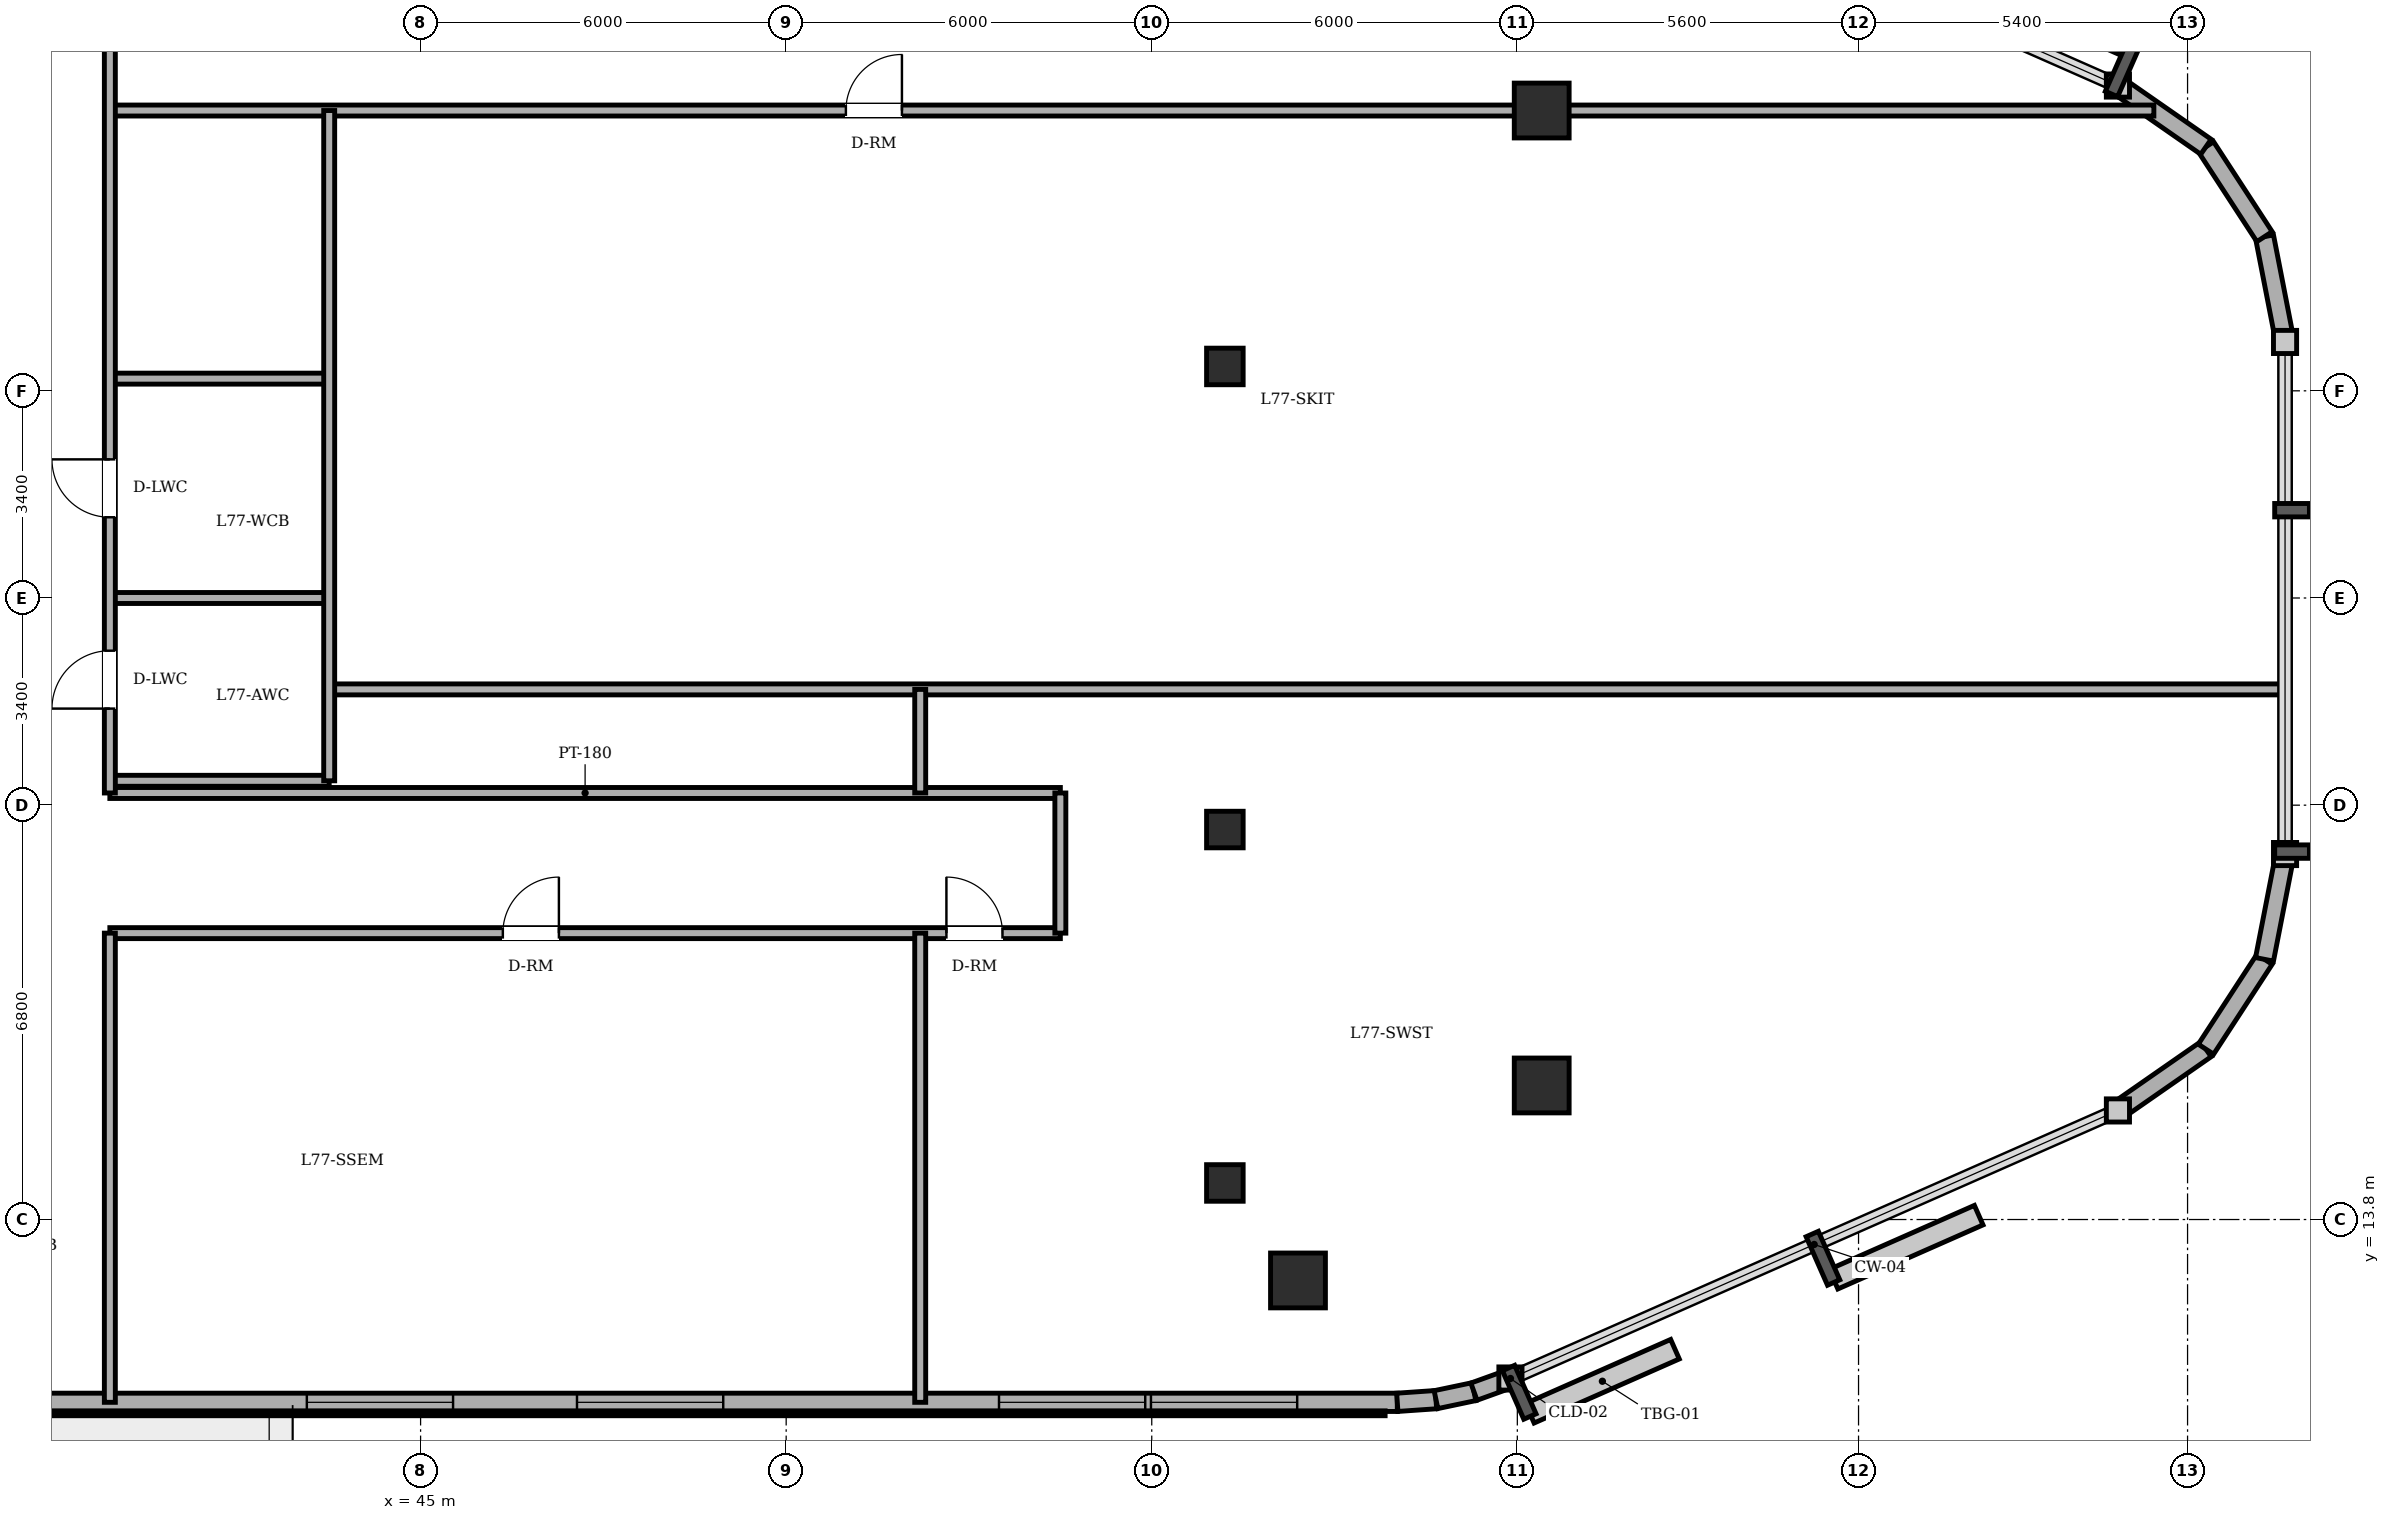
"""IFC4 building model, lengths in metres.
Left out: names, types, materials, properties, quantities, classifications, styles, units other than length and angle.
Written with IfcOpenShell. Run it as: python <this file> out.ifc"""

import sys

from ifc_helpers import new_model, si_unit, direction, frame, frame_2d, origin, origin_2d, place, context, subcontext, project, spatial, rectangle, circle, extrude, element, fill, save


model = new_model("IFC4")
c1 = context("Model", 3, precision=1e-05, world=origin(), true_north=direction((0.0, 1.0)))
c2 = subcontext(c1, "Body", "Model", "MODEL_VIEW")
j1 = project(units=[si_unit("LENGTHUNIT", "METRE"), si_unit("PLANEANGLEUNIT", "RADIAN")], contexts=[c1])
p1 = place(None, origin())
s1 = spatial("IfcSite", under=j1, at=p1, CompositionType="ELEMENT")
p2 = place(p1, origin())
s2 = spatial("IfcBuilding", under=s1, at=p2, CompositionType="ELEMENT")
p3 = place(p2, frame((0.0, 0.0, 295.3)))
s3 = spatial("IfcBuildingStorey", under=s2, at=p3, CompositionType="ELEMENT", Elevation=295.3)
for number, where, z_axis, x_axis in (
    (1, (59.4, 12.8, 0.0), (0.0, 0.0, 1.0), (1.0, 0.0, 0.0)),
    (2, (63.4, 16.0, 0.0), (0.0, 0.0, 1.0), (1.0, 0.0, 0.0)),
    (3, (63.4, 32.0, 0.0), (0.0, 0.0, 1.0), (1.0, 0.0, 0.0)),
):
    element("IfcColumn", number, at=place(p3, frame(where, z_axis=z_axis, x_axis=x_axis)), inside=s3, PredefinedType="COLUMN", context=c2, shape_type="SweptSolid", body=[
        extrude(circle(Radius=0.45, at=origin_2d()), origin(), (0.0, 0.0, 1.0), 5.1),
    ])
for number, where, z_axis, x_axis in (
    (4, (58.2, 14.4, 0.0), (0.0, 0.0, 1.0), (1.0, 0.0, 0.0)),
    (5, (58.2, 20.2, 0.0), (0.0, 0.0, 1.0), (1.0, 0.0, 0.0)),
    (6, (58.2, 27.8, 0.0), (0.0, 0.0, 1.0), (1.0, 0.0, 0.0)),
):
    element("IfcColumn", number, at=place(p3, frame(where, z_axis=z_axis, x_axis=x_axis)), inside=s3, PredefinedType="COLUMN", context=c2, shape_type="SweptSolid", body=[
        extrude(rectangle(XDim=0.6, YDim=0.6, at=origin_2d()), origin(), (0.0, 0.0, 1.0), 5.1),
    ])
p4 = place(p3, frame((24.0, 10.8, 0.0), z_axis=(0.0, 0.0, 1.0), x_axis=(1.0, 0.0, 0.0)))
e7 = element("IfcWall", 7, at=p4, inside=s3, PredefinedType="SOLIDWALL", context=c2, shape_type="SweptSolid", body=[
    extrude(rectangle(XDim=37.03, YDim=0.3, at=frame_2d((18.515, 0.0))), origin(), (0.0, 0.0, 1.0), 4.85),
])
p5 = place(p4, frame((6.425, 0.0, 0.0)))
e8 = element("IfcOpeningElement", 8, at=p5, cuts=e7, PredefinedType="OPENING", context=c2, shape_type="SweptSolid", body=[
    extrude(rectangle(XDim=0.95, YDim=2.2, at=frame_2d((0.475, 1.1))), frame((0.0, 0.16, 0.0), z_axis=(0.0, -1.0, 0.0), x_axis=(1.0, 0.0, 0.0)), (0.0, 0.0, 1.0), 0.32),
])
p6 = place(p4, frame((9.517, 0.0, 0.85)))
e9 = element("IfcOpeningElement", 9, at=p6, cuts=e7, PredefinedType="OPENING", context=c2, shape_type="SweptSolid", body=[
    extrude(rectangle(XDim=2.4, YDim=2.1, at=frame_2d((1.2, 1.05))), frame((0.0, 0.16, 0.0), z_axis=(0.0, -1.0, 0.0), x_axis=(1.0, 0.0, 0.0)), (0.0, 0.0, 1.0), 0.32),
])
p7 = place(p4, frame((19.133, 0.0, 0.85)))
e10 = element("IfcOpeningElement", 10, at=p7, cuts=e7, PredefinedType="OPENING", context=c2, shape_type="SweptSolid", body=[
    extrude(rectangle(XDim=2.4, YDim=2.1, at=frame_2d((1.2, 1.05))), frame((0.0, 0.16, 0.0), z_axis=(0.0, -1.0, 0.0), x_axis=(1.0, 0.0, 0.0)), (0.0, 0.0, 1.0), 0.32),
])
p8 = place(p4, frame((23.567, 0.0, 0.85)))
e11 = element("IfcOpeningElement", 11, at=p8, cuts=e7, PredefinedType="OPENING", context=c2, shape_type="SweptSolid", body=[
    extrude(rectangle(XDim=2.4, YDim=2.1, at=frame_2d((1.2, 1.05))), frame((0.0, 0.16, 0.0), z_axis=(0.0, -1.0, 0.0), x_axis=(1.0, 0.0, 0.0)), (0.0, 0.0, 1.0), 0.32),
])
p9 = place(p4, frame((30.493, 0.0, 0.85)))
e12 = element("IfcOpeningElement", 12, at=p9, cuts=e7, PredefinedType="OPENING", context=c2, shape_type="SweptSolid", body=[
    extrude(rectangle(XDim=2.4, YDim=2.1, at=frame_2d((1.2, 1.05))), frame((0.0, 0.16, 0.0), z_axis=(0.0, -1.0, 0.0), x_axis=(1.0, 0.0, 0.0)), (0.0, 0.0, 1.0), 0.32),
])
p10 = place(p4, frame((32.987, 0.0, 0.85)))
e13 = element("IfcOpeningElement", 13, at=p10, cuts=e7, PredefinedType="OPENING", context=c2, shape_type="SweptSolid", body=[
    extrude(rectangle(XDim=2.4, YDim=2.1, at=frame_2d((1.2, 1.05))), frame((0.0, 0.16, 0.0), z_axis=(0.0, -1.0, 0.0), x_axis=(1.0, 0.0, 0.0)), (0.0, 0.0, 1.0), 0.32),
])
p11 = place(p3, frame((61.03, 10.8, 0.0), z_axis=(0.0, 0.0, 1.0), x_axis=(0.997613959688, 0.069039028352, 0.0)))
e14 = element("IfcWall", 14, at=p11, inside=s3, PredefinedType="SOLIDWALL", context=c2, shape_type="SweptSolid", body=[
    extrude(rectangle(XDim=0.636, YDim=0.3, at=frame_2d((0.318, 0.0))), origin(), (0.0, 0.0, 1.0), 4.85),
])
p12 = place(p3, frame((61.665, 10.844, 0.0), z_axis=(0.0, 0.0, 1.0), x_axis=(0.97857012251, 0.205913854149, 0.0)))
e15 = element("IfcWall", 15, at=p12, inside=s3, PredefinedType="SOLIDWALL", context=c2, shape_type="SweptSolid", body=[
    extrude(rectangle(XDim=0.637, YDim=0.3, at=frame_2d((0.318, 0.0))), origin(), (0.0, 0.0, 1.0), 4.85),
])
p13 = place(p3, frame((62.288, 10.975, 0.0), z_axis=(0.0, 0.0, 1.0), x_axis=(0.94077491148, 0.339031806665, 0.0)))
e16 = element("IfcWall", 16, at=p13, inside=s3, PredefinedType="SOLIDWALL", context=c2, shape_type="SweptSolid", body=[
    extrude(rectangle(XDim=0.636, YDim=0.3, at=frame_2d((0.318, 0.0))), origin(), (0.0, 0.0, 1.0), 4.85),
])
p14 = place(p3, frame((72.857, 15.59, 0.0), z_axis=(0.0, 0.0, 1.0), x_axis=(0.821006966142, 0.570918174124, 0.0)))
e17 = element("IfcWall", 17, at=p14, inside=s3, PredefinedType="SOLIDWALL", context=c2, shape_type="SweptSolid", body=[
    extrude(rectangle(XDim=1.76, YDim=0.3, at=frame_2d((0.88, 0.0))), origin(), (0.0, 0.0, 1.0), 4.85),
])
for number, where, z_axis, x_axis in (
    (18, (74.302, 16.595, 0.0), (0.0, 0.0, 1.0), (0.546, 0.838, 0.0)),
    (19, (75.263, 18.07, 0.0), (0.0, 0.0, 1.0), (0.192, 0.981, 0.0)),
    (20, (75.6, 28.202, 0.0), (0.0, 0.0, 1.0), (-0.192, 0.981, 0.0)),
    (21, (75.263, 29.93, 0.0), (0.0, 0.0, 1.0), (-0.546, 0.838, 0.0)),
):
    element("IfcWall", number, at=place(p3, frame(where, z_axis=z_axis, x_axis=x_axis)), inside=s3, PredefinedType="SOLIDWALL", context=c2, shape_type="SweptSolid", body=[
        extrude(rectangle(XDim=1.76, YDim=0.3, at=frame_2d((0.88, 0.0))), origin(), (0.0, 0.0, 1.0), 4.85),
    ])
p15 = place(p3, frame((74.302, 31.405, 0.0), z_axis=(0.0, 0.0, 1.0), x_axis=(-0.821006966142, 0.570918174124, 0.0)))
e22 = element("IfcWall", 22, at=p15, inside=s3, PredefinedType="SOLIDWALL", context=c2, shape_type="SweptSolid", body=[
    extrude(rectangle(XDim=1.76, YDim=0.3, at=frame_2d((0.88, 0.0))), origin(), (0.0, 0.0, 1.0), 4.85),
])
p16 = place(p3, frame((39.9, 18.5, 0.0), z_axis=(0.0, 0.0, 1.0), x_axis=(1.0, 0.0, 0.0)))
e23 = element("IfcWall", 23, at=p16, inside=s3, PredefinedType="PARTITIONING", context=c2, shape_type="SweptSolid", body=[
    extrude(rectangle(XDim=15.6, YDim=0.18, at=frame_2d((7.8, 0.0))), origin(), (0.0, 0.0, 1.0), 4.85),
])
p17 = place(p16, frame((6.45, 0.0, 0.0)))
e24 = element("IfcOpeningElement", 24, at=p17, cuts=e23, PredefinedType="OPENING", context=c2, shape_type="SweptSolid", body=[
    extrude(rectangle(XDim=0.92, YDim=2.1, at=frame_2d((0.46, 1.05))), frame((0.0, 0.1, 0.0), z_axis=(0.0, -1.0, 0.0), x_axis=(1.0, 0.0, 0.0)), (0.0, 0.0, 1.0), 0.2),
])
p18 = place(p16, frame((13.73, 0.0, 0.0)))
e25 = element("IfcOpeningElement", 25, at=p18, cuts=e23, PredefinedType="OPENING", context=c2, shape_type="SweptSolid", body=[
    extrude(rectangle(XDim=0.92, YDim=2.1, at=frame_2d((0.46, 1.05))), frame((0.0, 0.1, 0.0), z_axis=(0.0, -1.0, 0.0), x_axis=(1.0, 0.0, 0.0)), (0.0, 0.0, 1.0), 0.2),
])
p19 = place(p3, frame((39.9, 20.8, 0.0), z_axis=(0.0, 0.0, 1.0), x_axis=(1.0, 0.0, 0.0)))
e26 = element("IfcWall", 26, at=p19, inside=s3, PredefinedType="PARTITIONING", context=c2, shape_type="SweptSolid", body=[
    extrude(rectangle(XDim=15.6, YDim=0.18, at=frame_2d((7.8, 0.0))), origin(), (0.0, 0.0, 1.0), 4.85),
])
p20 = place(p3, frame((39.9, 21.0, 0.0), z_axis=(0.0, 0.0, 1.0), x_axis=(1.0, 0.0, 0.0)))
e27 = element("IfcWall", 27, at=p20, inside=s3, PredefinedType="PARTITIONING", context=c2, shape_type="SweptSolid", body=[
    extrude(rectangle(XDim=3.6, YDim=0.18, at=frame_2d((1.8, 0.0))), origin(), (0.0, 0.0, 1.0), 4.85),
])
p21 = place(p3, frame((43.5, 22.5, 0.0), z_axis=(0.0, 0.0, 1.0), x_axis=(1.0, 0.0, 0.0)))
e28 = element("IfcWall", 28, at=p21, inside=s3, PredefinedType="PARTITIONING", context=c2, shape_type="SweptSolid", body=[
    extrude(rectangle(XDim=32.1, YDim=0.18, at=frame_2d((16.05, 0.0))), origin(), (0.0, 0.0, 1.0), 4.85),
])
p22 = place(p3, frame((39.9, 24.0, 0.0), z_axis=(0.0, 0.0, 1.0), x_axis=(1.0, 0.0, 0.0)))
e29 = element("IfcWall", 29, at=p22, inside=s3, PredefinedType="PARTITIONING", context=c2, shape_type="SweptSolid", body=[
    extrude(rectangle(XDim=3.6, YDim=0.18, at=frame_2d((1.8, 0.0))), origin(), (0.0, 0.0, 1.0), 4.592),
])
p23 = place(p3, frame((39.9, 27.6, 0.0), z_axis=(0.0, 0.0, 1.0), x_axis=(1.0, 0.0, 0.0)))
e30 = element("IfcWall", 30, at=p23, inside=s3, PredefinedType="PARTITIONING", context=c2, shape_type="SweptSolid", body=[
    extrude(rectangle(XDim=3.6, YDim=0.18, at=frame_2d((1.8, 0.0))), origin(), (0.0, 0.0, 1.0), 4.492),
])
p24 = place(p3, frame((39.9, 32.0, 0.0), z_axis=(0.0, 0.0, 1.0), x_axis=(1.0, 0.0, 0.0)))
e31 = element("IfcWall", 31, at=p24, inside=s3, PredefinedType="PARTITIONING", context=c2, shape_type="SweptSolid", body=[
    extrude(rectangle(XDim=33.547, YDim=0.18, at=frame_2d((16.773, 0.0))), origin(), (0.0, 0.0, 1.0), 4.592),
])
p25 = place(p24, frame((12.08, 0.0, 0.0)))
e32 = element("IfcOpeningElement", 32, at=p25, cuts=e31, PredefinedType="OPENING", context=c2, shape_type="SweptSolid", body=[
    extrude(rectangle(XDim=0.92, YDim=2.1, at=frame_2d((0.46, 1.05))), frame((0.0, 0.1, 0.0), z_axis=(0.0, -1.0, 0.0), x_axis=(1.0, 0.0, 0.0)), (0.0, 0.0, 1.0), 0.2),
])
p26 = place(p3, frame((39.9, 10.8, 0.0), z_axis=(0.0, 0.0, 1.0), x_axis=(0.0, 1.0, 0.0)))
e33 = element("IfcWall", 33, at=p26, inside=s3, PredefinedType="PARTITIONING", context=c2, shape_type="SweptSolid", body=[
    extrude(rectangle(XDim=7.7, YDim=0.18, at=frame_2d((3.85, 0.0))), origin(), (0.0, 0.0, 1.0), 4.85),
])
p27 = place(p3, frame((39.9, 20.8, 0.0), z_axis=(0.0, 0.0, 1.0), x_axis=(0.0, 1.0, 0.0)))
e34 = element("IfcWall", 34, at=p27, inside=s3, PredefinedType="PARTITIONING", context=c2, shape_type="SweptSolid", body=[
    extrude(rectangle(XDim=16.4, YDim=0.18, at=frame_2d((8.2, 0.0))), origin(), (0.0, 0.0, 1.0), 4.85),
])
p28 = place(p27, frame((1.385, 0.0, 0.0)))
e35 = element("IfcOpeningElement", 35, at=p28, cuts=e34, PredefinedType="OPENING", context=c2, shape_type="SweptSolid", body=[
    extrude(rectangle(XDim=0.95, YDim=2.15, at=frame_2d((0.475, 1.075))), frame((0.0, 0.1, 0.0), z_axis=(0.0, -1.0, 0.0), x_axis=(1.0, 0.0, 0.0)), (0.0, 0.0, 1.0), 0.2),
])
p29 = place(p27, frame((4.525, 0.0, 0.0)))
e36 = element("IfcOpeningElement", 36, at=p29, cuts=e34, PredefinedType="OPENING", context=c2, shape_type="SweptSolid", body=[
    extrude(rectangle(XDim=0.95, YDim=2.15, at=frame_2d((0.475, 1.075))), frame((0.0, 0.1, 0.0), z_axis=(0.0, -1.0, 0.0), x_axis=(1.0, 0.0, 0.0)), (0.0, 0.0, 1.0), 0.2),
])
p30 = place(p27, frame((12.84, 0.0, 0.0)))
e37 = element("IfcOpeningElement", 37, at=p30, cuts=e34, PredefinedType="OPENING", context=c2, shape_type="SweptSolid", body=[
    extrude(rectangle(XDim=0.92, YDim=2.1, at=frame_2d((0.46, 1.05))), frame((0.0, 0.1, 0.0), z_axis=(0.0, -1.0, 0.0), x_axis=(1.0, 0.0, 0.0)), (0.0, 0.0, 1.0), 0.2),
])
p31 = place(p3, frame((43.5, 21.0, 0.0), z_axis=(0.0, 0.0, 1.0), x_axis=(0.0, 1.0, 0.0)))
e38 = element("IfcWall", 38, at=p31, inside=s3, PredefinedType="PARTITIONING", context=c2, shape_type="SweptSolid", body=[
    extrude(rectangle(XDim=11.0, YDim=0.18, at=frame_2d((5.5, 0.0))), origin(), (0.0, 0.0, 1.0), 2.432),
])
p32 = place(p3, frame((53.2, 10.8, 0.0), z_axis=(0.0, 0.0, 1.0), x_axis=(0.0, 1.0, 0.0)))
e39 = element("IfcWall", 39, at=p32, inside=s3, PredefinedType="PARTITIONING", context=c2, shape_type="SweptSolid", body=[
    extrude(rectangle(XDim=7.7, YDim=0.18, at=frame_2d((3.85, 0.0))), origin(), (0.0, 0.0, 1.0), 4.85),
])
p33 = place(p3, frame((53.2, 20.8, 0.0), z_axis=(0.0, 0.0, 1.0), x_axis=(0.0, 1.0, 0.0)))
e40 = element("IfcWall", 40, at=p33, inside=s3, PredefinedType="PARTITIONING", context=c2, shape_type="SweptSolid", body=[
    extrude(rectangle(XDim=1.7, YDim=0.18, at=frame_2d((0.85, 0.0))), origin(), (0.0, 0.0, 1.0), 4.85),
])
p34 = place(p3, frame((55.5, 18.5, 0.0), z_axis=(0.0, 0.0, 1.0), x_axis=(0.0, 1.0, 0.0)))
e41 = element("IfcWall", 41, at=p34, inside=s3, PredefinedType="PARTITIONING", context=c2, shape_type="SweptSolid", body=[
    extrude(rectangle(XDim=2.3, YDim=0.18, at=frame_2d((1.15, 0.0))), origin(), (0.0, 0.0, 1.0), 4.85),
])
p35 = place(p7, origin())
e42 = element("IfcWindow", 42, at=p35, inside=s3, PartitioningType="TRIPLE_PANEL_VERTICAL", PredefinedType="WINDOW", context=c2, shape_type="SweptSolid", body=[
    extrude(rectangle(XDim=2.4, YDim=2.1, at=frame_2d((1.2, 1.05))), frame((0.0, 0.03, 0.0), z_axis=(0.0, -1.0, 0.0), x_axis=(1.0, 0.0, 0.0)), (0.0, 0.0, 1.0), 0.06),
])
fill(e10, e42)
p36 = place(p8, origin())
e43 = element("IfcWindow", 43, at=p36, inside=s3, PartitioningType="TRIPLE_PANEL_VERTICAL", PredefinedType="WINDOW", context=c2, shape_type="SweptSolid", body=[
    extrude(rectangle(XDim=2.4, YDim=2.1, at=frame_2d((1.2, 1.05))), frame((0.0, 0.03, 0.0), z_axis=(0.0, -1.0, 0.0), x_axis=(1.0, 0.0, 0.0)), (0.0, 0.0, 1.0), 0.06),
])
fill(e11, e43)
p37 = place(p9, origin())
e44 = element("IfcWindow", 44, at=p37, inside=s3, PartitioningType="TRIPLE_PANEL_VERTICAL", PredefinedType="WINDOW", context=c2, shape_type="SweptSolid", body=[
    extrude(rectangle(XDim=2.4, YDim=2.1, at=frame_2d((1.2, 1.05))), frame((0.0, 0.03, 0.0), z_axis=(0.0, -1.0, 0.0), x_axis=(1.0, 0.0, 0.0)), (0.0, 0.0, 1.0), 0.06),
])
fill(e12, e44)
p38 = place(p10, origin())
e45 = element("IfcWindow", 45, at=p38, inside=s3, PartitioningType="TRIPLE_PANEL_VERTICAL", PredefinedType="WINDOW", context=c2, shape_type="SweptSolid", body=[
    extrude(rectangle(XDim=2.4, YDim=2.1, at=frame_2d((1.2, 1.05))), frame((0.0, 0.03, 0.0), z_axis=(0.0, -1.0, 0.0), x_axis=(1.0, 0.0, 0.0)), (0.0, 0.0, 1.0), 0.06),
])
fill(e13, e45)
p39 = place(p28, origin())
e46 = element("IfcDoor", 46, at=p39, inside=s3, OperationType="SINGLE_SWING_LEFT", PredefinedType="DOOR", context=c2, shape_type="SweptSolid", body=[
    extrude(rectangle(XDim=0.95, YDim=2.15, at=frame_2d((0.475, 1.075))), frame((0.0, 0.025, 0.0), z_axis=(0.0, -1.0, 0.0), x_axis=(1.0, 0.0, 0.0)), (0.0, 0.0, 1.0), 0.05),
])
fill(e35, e46)
p40 = place(p29, origin())
e47 = element("IfcDoor", 47, at=p40, inside=s3, OperationType="SINGLE_SWING_RIGHT", PredefinedType="DOOR", context=c2, shape_type="SweptSolid", body=[
    extrude(rectangle(XDim=0.95, YDim=2.15, at=frame_2d((0.475, 1.075))), frame((0.0, 0.025, 0.0), z_axis=(0.0, -1.0, 0.0), x_axis=(1.0, 0.0, 0.0)), (0.0, 0.0, 1.0), 0.05),
])
fill(e36, e47)
p41 = place(p17, origin())
e48 = element("IfcDoor", 48, at=p41, inside=s3, OperationType="SINGLE_SWING_RIGHT", PredefinedType="DOOR", context=c2, shape_type="SweptSolid", body=[
    extrude(rectangle(XDim=0.92, YDim=2.1, at=frame_2d((0.46, 1.05))), frame((0.0, 0.025, 0.0), z_axis=(0.0, -1.0, 0.0), x_axis=(1.0, 0.0, 0.0)), (0.0, 0.0, 1.0), 0.05),
])
fill(e24, e48)
p42 = place(p18, origin())
e49 = element("IfcDoor", 49, at=p42, inside=s3, OperationType="SINGLE_SWING_LEFT", PredefinedType="DOOR", context=c2, shape_type="SweptSolid", body=[
    extrude(rectangle(XDim=0.92, YDim=2.1, at=frame_2d((0.46, 1.05))), frame((0.0, 0.025, 0.0), z_axis=(0.0, -1.0, 0.0), x_axis=(1.0, 0.0, 0.0)), (0.0, 0.0, 1.0), 0.05),
])
fill(e25, e49)
p43 = place(p25, origin())
e50 = element("IfcDoor", 50, at=p43, inside=s3, OperationType="SINGLE_SWING_RIGHT", PredefinedType="DOOR", context=c2, shape_type="SweptSolid", body=[
    extrude(rectangle(XDim=0.92, YDim=2.1, at=frame_2d((0.46, 1.05))), frame((0.0, 0.025, 0.0), z_axis=(0.0, -1.0, 0.0), x_axis=(1.0, 0.0, 0.0)), (0.0, 0.0, 1.0), 0.05),
])
fill(e32, e50)
save(model, sys.argv[1])
